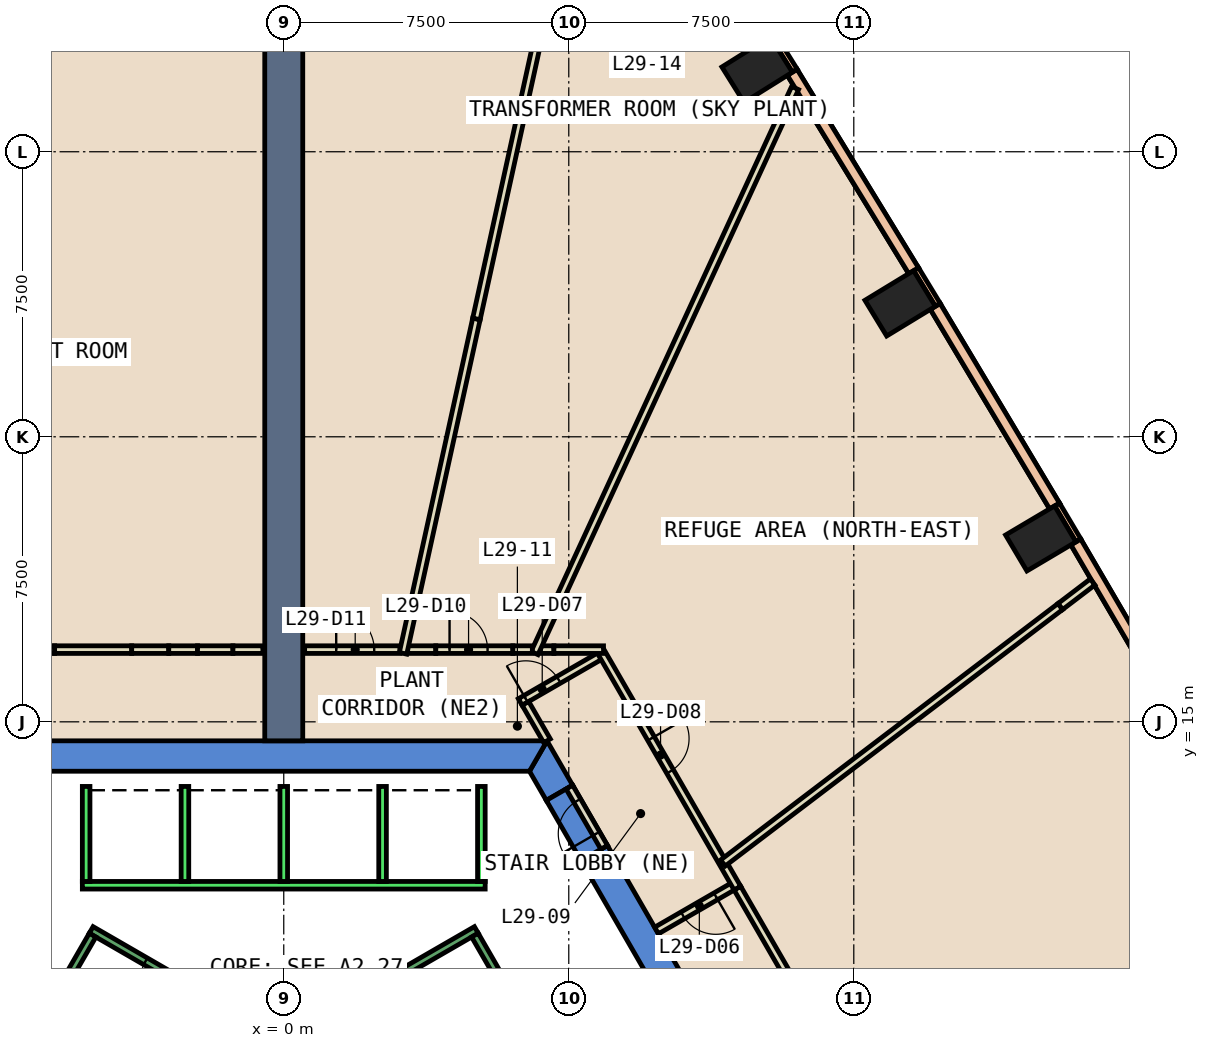
"""IFC4 building model, lengths in metres.
Left out: names, types, materials, properties, quantities, classifications, styles, units other than length and angle.
Written with IfcOpenShell. Run it as: python <this file> out.ifc"""

import sys

from ifc_helpers import new_model, si_unit, direction, frame, frame_2d, origin, origin_2d, place, context, subcontext, project, spatial, polyline, rectangle, outline, extrude, element, fill, save


model = new_model("IFC4")
c1 = context("Model", 3, precision=1e-05, world=origin(), true_north=direction((0.0, 1.0)))
c2 = subcontext(c1, "Body", "Model", "MODEL_VIEW")
j1 = project(units=[si_unit("LENGTHUNIT", "METRE"), si_unit("PLANEANGLEUNIT", "RADIAN")], contexts=[c1])
p1 = place(None, origin())
s1 = spatial("IfcSite", under=j1, at=p1, CompositionType="ELEMENT")
p2 = place(p1, origin())
s2 = spatial("IfcBuilding", under=s1, at=p2, CompositionType="ELEMENT")
p3 = place(p2, frame((0.0, 0.0, 132.8)))
s3 = spatial("IfcBuildingStorey", under=s2, at=p3, CompositionType="ELEMENT", Elevation=132.8)
for number, where, z_axis, x_axis in (
    (1, (19.92, 19.825, -0.6), (0.0, 0.0, 1.0), (-0.51, 0.86, 0.0)),
    (2, (16.22, 26.012, -0.6), (0.0, 0.0, 1.0), (-0.52, 0.854, 0.0)),
    (3, (12.457, 32.162, -0.6), (0.0, 0.0, 1.0), (-0.53, 0.848, 0.0)),
):
    element("IfcColumn", number, at=place(p3, frame(where, z_axis=z_axis, x_axis=x_axis)), inside=s3, PredefinedType="COLUMN", context=c2, shape_type="SweptSolid", body=[
        extrude(rectangle(XDim=1.1, YDim=1.5, at=origin_2d()), origin(), (0.0, 0.0, 1.0), 5.4),
    ])
p4 = place(p3, frame((0.0, 0.0, -0.6)))
e4 = element("IfcWall", 4, at=p4, inside=s3, PredefinedType="SHEAR", context=c2, shape_type="SweptSolid", body=[
    extrude(outline(polyline([(8.517, 11.747), (7.824, 11.347), (12.933, 2.5), (13.856, 2.5), (8.517, 11.747)])), origin(), (0.0, 0.0, 1.0), 5.4),
])
p5 = place(p3, frame((0.0, 0.0, -0.6)))
e5 = element("IfcWall", 5, at=p5, inside=s3, PredefinedType="SHEAR", context=c2, shape_type="SweptSolid", body=[
    extrude(outline(polyline([(6.909, 12.932), (7.602, 13.332), (6.928, 14.5), (6.466, 13.7), (6.909, 12.932)])), origin(), (0.0, 0.0, 1.0), 5.4),
])
p6 = place(p3, frame((0.0, 0.0, 3.6)))
e6 = element("IfcWall", 6, at=p6, inside=s3, PredefinedType="SHEAR", context=c2, shape_type="SweptSolid", body=[
    extrude(outline(polyline([(7.602, 13.332), (6.909, 12.932), (7.824, 11.347), (8.517, 11.747), (7.602, 13.332)])), origin(), (0.0, 0.0, 1.0), 1.2),
])
p7 = place(p3, frame((0.0, 0.0, -0.6)))
e7 = element("IfcWall", 7, at=p7, inside=s3, PredefinedType="SHEAR", context=c2, shape_type="SweptSolid", body=[
    extrude(outline(polyline([(6.928, 14.5), (-6.928, 14.5), (-6.466, 13.7), (6.466, 13.7), (6.928, 14.5)])), origin(), (0.0, 0.0, 1.0), 5.4),
])
p8 = place(p3, frame((0.0, 14.5, 0.0), z_axis=(0.0, 0.0, 1.0), x_axis=(0.0, 1.0, 0.0)))
e8 = element("IfcWall", 8, at=p8, inside=s3, PredefinedType="SHEAR", context=c2, shape_type="SweptSolid", body=[
    extrude(rectangle(XDim=27.714, YDim=1.0, at=frame_2d((13.857, 0.0))), origin(), (0.0, 0.0, 1.0), 4.8),
])
p9 = place(p3, frame((20.91, 19.773, 0.0), z_axis=(0.0, 0.0, 1.0), x_axis=(-0.509918002375, 0.860223012279, 0.0)))
e9 = element("IfcWall", 9, at=p9, inside=s3, PredefinedType="STANDARD", context=c2, shape_type="SweptSolid", body=[
    extrude(rectangle(XDim=1.1, YDim=0.15, at=frame_2d((0.55, 0.0))), origin(), (0.0, 0.0, 1.0), 4.8),
])
p10 = place(p3, frame((17.211, 25.971, 0.0), z_axis=(0.0, 0.0, 1.0), x_axis=(-0.519869515594, 0.854245682901, 0.0)))
e10 = element("IfcWall", 10, at=p10, inside=s3, PredefinedType="STANDARD", context=c2, shape_type="SweptSolid", body=[
    extrude(rectangle(XDim=1.1, YDim=0.15, at=frame_2d((0.55, 0.0))), origin(), (0.0, 0.0, 1.0), 4.8),
])
p11 = place(p3, frame((13.448, 32.133, 0.0), z_axis=(0.0, 0.0, 1.0), x_axis=(-0.52997899071, 0.848010771987, 0.0)))
e11 = element("IfcWall", 11, at=p11, inside=s3, PredefinedType="STANDARD", context=c2, shape_type="SweptSolid", body=[
    extrude(rectangle(XDim=1.1, YDim=0.15, at=frame_2d((0.55, 0.0))), origin(), (0.0, 0.0, 1.0), 4.8),
])
p12 = place(p3, frame((23.928, 14.449, 0.0), z_axis=(0.0, 0.0, 1.0), x_axis=(-0.504315008855, 0.863519757645, 0.0)))
e12 = element("IfcWall", 12, at=p12, inside=s3, PredefinedType="STANDARD", context=c2, shape_type="SweptSolid", body=[
    extrude(rectangle(XDim=6.119, YDim=0.3, at=frame_2d((3.06, 0.0))), origin(), (0.0, 0.0, 1.0), 1.2),
])
p13 = place(p3, frame((23.928, 14.449, 4.0), z_axis=(0.0, 0.0, 1.0), x_axis=(-0.504315008855, 0.863519757645, 0.0)))
e13 = element("IfcWall", 13, at=p13, inside=s3, PredefinedType="STANDARD", context=c2, shape_type="SweptSolid", body=[
    extrude(rectangle(XDim=6.119, YDim=0.3, at=frame_2d((3.06, 0.0))), origin(), (0.0, 0.0, 1.0), 0.8),
])
p14 = place(p3, frame((20.283, 20.679, 0.0), z_axis=(0.0, 0.0, 1.0), x_axis=(-0.513139723686, 0.858305087935, 0.0)))
e14 = element("IfcWall", 14, at=p14, inside=s3, PredefinedType="STANDARD", context=c2, shape_type="SweptSolid", body=[
    extrude(rectangle(XDim=6.119, YDim=0.3, at=frame_2d((3.06, 0.0))), origin(), (0.0, 0.0, 1.0), 1.2),
])
p15 = place(p3, frame((20.283, 20.679, 4.0), z_axis=(0.0, 0.0, 1.0), x_axis=(-0.513139723686, 0.858305087935, 0.0)))
e15 = element("IfcWall", 15, at=p15, inside=s3, PredefinedType="STANDARD", context=c2, shape_type="SweptSolid", body=[
    extrude(rectangle(XDim=6.119, YDim=0.3, at=frame_2d((3.06, 0.0))), origin(), (0.0, 0.0, 1.0), 0.8),
])
p16 = place(p3, frame((16.574, 26.87, 0.0), z_axis=(0.0, 0.0, 1.0), x_axis=(-0.521983927326, 0.852955320995, 0.0)))
e16 = element("IfcWall", 16, at=p16, inside=s3, PredefinedType="STANDARD", context=c2, shape_type="SweptSolid", body=[
    extrude(rectangle(XDim=6.121, YDim=0.3, at=frame_2d((3.061, 0.0))), origin(), (0.0, 0.0, 1.0), 1.2),
])
p17 = place(p3, frame((16.574, 26.87, 4.0), z_axis=(0.0, 0.0, 1.0), x_axis=(-0.521983927326, 0.852955320995, 0.0)))
e17 = element("IfcWall", 17, at=p17, inside=s3, PredefinedType="STANDARD", context=c2, shape_type="SweptSolid", body=[
    extrude(rectangle(XDim=6.121, YDim=0.3, at=frame_2d((3.061, 0.0))), origin(), (0.0, 0.0, 1.0), 0.8),
])
p18 = place(p3, frame((11.888, 10.709, 0.0), z_axis=(0.0, 0.0, 1.0), x_axis=(-0.865973769406, -0.500089422704, 0.0)))
e18 = element("IfcWall", 18, at=p18, inside=s3, PredefinedType="PARTITIONING", context=c2, shape_type="SweptSolid", body=[
    extrude(rectangle(XDim=2.399, YDim=0.2, at=frame_2d((1.2, 0.0))), origin(), (0.0, 0.0, 1.0), 2.4),
])
p19 = place(p18, frame((0.6, 0.0, 0.0)))
e19 = element("IfcOpeningElement", 19, at=p19, cuts=e18, PredefinedType="OPENING", context=c2, shape_type="SweptSolid", body=[
    extrude(rectangle(XDim=1.0, YDim=2.1, at=frame_2d((0.5, 1.05))), frame((0.0, 0.11, 0.0), z_axis=(0.0, -1.0, 0.0), x_axis=(1.0, 0.0, 0.0)), (0.0, 0.0, 1.0), 0.22),
])
p20 = place(p3, frame((6.223, 15.521, 0.0), z_axis=(0.0, 0.0, 1.0), x_axis=(0.866022959057, 0.500004234368, 0.0)))
e20 = element("IfcWall", 20, at=p20, inside=s3, PredefinedType="PARTITIONING", context=c2, shape_type="SweptSolid", body=[
    extrude(rectangle(XDim=2.5, YDim=0.2, at=frame_2d((1.25, 0.0))), origin(), (0.0, 0.0, 1.0), 4.8),
])
p21 = place(p20, frame((0.168, 0.0, 0.0)))
e21 = element("IfcOpeningElement", 21, at=p21, cuts=e20, PredefinedType="OPENING", context=c2, shape_type="SweptSolid", body=[
    extrude(rectangle(XDim=1.0, YDim=2.1, at=frame_2d((0.5, 1.05))), frame((0.0, 0.11, 0.0), z_axis=(0.0, -1.0, 0.0), x_axis=(1.0, 0.0, 0.0)), (0.0, 0.0, 1.0), 0.22),
])
p22 = place(p3, frame((6.36, 15.484, 0.0), z_axis=(0.0, 0.0, 1.0), x_axis=(0.499883687939, -0.866092546171, 0.0)))
e22 = element("IfcWall", 22, at=p22, inside=s3, PredefinedType="PARTITIONING", context=c2, shape_type="SweptSolid", body=[
    extrude(rectangle(XDim=1.136, YDim=0.2, at=frame_2d((0.568, 0.0))), origin(), (0.0, 0.0, 1.0), 2.4),
])
p23 = place(p3, frame((8.338, 16.858, 0.0), z_axis=(0.0, 0.0, 1.0), x_axis=(0.499982693035, -0.866035395735, 0.0)))
e23 = element("IfcWall", 23, at=p23, inside=s3, PredefinedType="PARTITIONING", context=c2, shape_type="SweptSolid", body=[
    extrude(rectangle(XDim=7.2, YDim=0.2, at=frame_2d((3.6, 0.0))), origin(), (0.0, 0.0, 1.0), 4.8),
])
p24 = place(p23, frame((2.655, 0.0, 0.0)))
e24 = element("IfcOpeningElement", 24, at=p24, cuts=e23, PredefinedType="OPENING", context=c2, shape_type="SweptSolid", body=[
    extrude(rectangle(XDim=1.0, YDim=2.1, at=frame_2d((0.5, 1.05))), frame((0.0, 0.11, 0.0), z_axis=(0.0, -1.0, 0.0), x_axis=(1.0, 0.0, 0.0)), (0.0, 0.0, 1.0), 0.22),
])
p25 = place(p3, frame((11.938, 10.622, 0.0), z_axis=(0.0, 0.0, 1.0), x_axis=(0.499964736285, -0.866045762343, 0.0)))
e25 = element("IfcWall", 25, at=p25, inside=s3, PredefinedType="PARTITIONING", context=c2, shape_type="SweptSolid", body=[
    extrude(rectangle(XDim=9.479, YDim=0.2, at=frame_2d((4.739, 0.0))), origin(), (0.0, 0.0, 1.0), 4.8),
])
p26 = place(p25, frame((8.161, 0.0, 0.0)))
e26 = element("IfcOpeningElement", 26, at=p26, cuts=e25, PredefinedType="OPENING", context=c2, shape_type="SweptSolid", body=[
    extrude(rectangle(XDim=1.0, YDim=2.1, at=frame_2d((0.5, 1.05))), frame((0.0, 0.11, 0.0), z_axis=(0.0, -1.0, 0.0), x_axis=(1.0, 0.0, 0.0)), (0.0, 0.0, 1.0), 0.22),
])
p27 = place(p3, frame((6.741, 16.9, 0.0), z_axis=(0.0, 0.0, 1.0), x_axis=(1.0, 0.0, 0.0)))
e27 = element("IfcWall", 27, at=p27, inside=s3, PredefinedType="PARTITIONING", context=c2, shape_type="SweptSolid", body=[
    extrude(rectangle(XDim=0.368, YDim=0.2, at=frame_2d((0.184, 0.0))), origin(), (0.0, 0.0, 1.0), 2.4),
])
p28 = place(p3, frame((3.26, 16.9, 0.0), z_axis=(0.0, 0.0, 1.0), x_axis=(1.0, 0.0, 0.0)))
e28 = element("IfcWall", 28, at=p28, inside=s3, PredefinedType="PARTITIONING", context=c2, shape_type="SweptSolid", body=[
    extrude(rectangle(XDim=0.741, YDim=0.2, at=frame_2d((0.371, 0.0))), origin(), (0.0, 0.0, 1.0), 2.4),
])
p29 = place(p3, frame((0.55, 16.9, 0.0), z_axis=(0.0, 0.0, 1.0), x_axis=(1.0, 0.0, 0.0)))
e29 = element("IfcWall", 29, at=p29, inside=s3, PredefinedType="PARTITIONING", context=c2, shape_type="SweptSolid", body=[
    extrude(rectangle(XDim=2.51, YDim=0.2, at=frame_2d((1.255, 0.0))), origin(), (0.0, 0.0, 1.0), 4.8),
])
p30 = place(p29, frame((0.83, 0.0, 0.0)))
e30 = element("IfcOpeningElement", 30, at=p30, cuts=e29, PredefinedType="OPENING", context=c2, shape_type="SweptSolid", body=[
    extrude(rectangle(XDim=1.0, YDim=2.1, at=frame_2d((0.5, 1.05))), frame((0.0, 0.11, 0.0), z_axis=(0.0, -1.0, 0.0), x_axis=(1.0, 0.0, 0.0)), (0.0, 0.0, 1.0), 0.22),
])
p31 = place(p3, frame((21.284, 18.68, 0.0), z_axis=(0.0, 0.0, 1.0), x_axis=(-0.795986361327, -0.605314556723, 0.0)))
e31 = element("IfcWall", 31, at=p31, inside=s3, PredefinedType="PARTITIONING", context=c2, shape_type="SweptSolid", body=[
    extrude(rectangle(XDim=1.07, YDim=0.2, at=frame_2d((0.535, 0.0))), origin(), (0.0, 0.0, 1.0), 2.4),
])
p32 = place(p3, frame((6.599, 16.809, 0.0), z_axis=(0.0, 0.0, 1.0), x_axis=(0.418797177025, 0.908079800742, 0.0)))
e32 = element("IfcWall", 32, at=p32, inside=s3, PredefinedType="PARTITIONING", context=c2, shape_type="SweptSolid", body=[
    extrude(rectangle(XDim=16.373, YDim=0.2, at=frame_2d((8.187, 0.0))), origin(), (0.0, 0.0, 1.0), 2.4),
])
p33 = place(p3, frame((3.139, 16.802, 0.0), z_axis=(0.0, 0.0, 1.0), x_axis=(0.21434739217, 0.976757490614, 0.0)))
e33 = element("IfcWall", 33, at=p33, inside=s3, PredefinedType="PARTITIONING", context=c2, shape_type="SweptSolid", body=[
    extrude(rectangle(XDim=9.01, YDim=0.2, at=frame_2d((4.505, 0.0))), origin(), (0.0, 0.0, 1.0), 2.4),
])
p34 = place(p3, frame((8.431, 11.698, 0.0), z_axis=(0.0, 0.0, 1.0), x_axis=(-0.500115259676, 0.865958848352, 0.0)))
e34 = element("IfcWall", 34, at=p34, inside=s3, PredefinedType="PARTITIONING", context=c2, shape_type="SweptSolid", body=[
    extrude(rectangle(XDim=1.829, YDim=0.2, at=frame_2d((0.915, 0.0))), origin(), (0.0, 0.0, 1.0), 2.4),
])
p35 = place(p34, frame((0.415, 0.0, 0.0)))
e35 = element("IfcOpeningElement", 35, at=p35, cuts=e34, PredefinedType="OPENING", context=c2, shape_type="SweptSolid", body=[
    extrude(rectangle(XDim=1.0, YDim=2.1, at=frame_2d((0.5, 1.05))), frame((0.0, 0.11, 0.0), z_axis=(0.0, -1.0, 0.0), x_axis=(1.0, 0.0, 0.0)), (0.0, 0.0, 1.0), 0.22),
])
p36 = place(p3, frame((7.109, 16.9, 0.0), z_axis=(0.0, 0.0, 1.0), x_axis=(1.0, 0.0, 0.0)))
e36 = element("IfcWall", 36, at=p36, inside=s3, PredefinedType="PARTITIONING", context=c2, shape_type="SweptSolid", body=[
    extrude(rectangle(XDim=1.305, YDim=0.2, at=frame_2d((0.653, 0.0))), origin(), (0.0, 0.0, 1.0), 4.8),
])
p37 = place(p3, frame((4.001, 16.9, 0.0), z_axis=(0.0, 0.0, 1.0), x_axis=(1.0, 0.0, 0.0)))
e37 = element("IfcWall", 37, at=p37, inside=s3, PredefinedType="PARTITIONING", context=c2, shape_type="SweptSolid", body=[
    extrude(rectangle(XDim=2.028, YDim=0.2, at=frame_2d((1.014, 0.0))), origin(), (0.0, 0.0, 1.0), 4.8),
])
p38 = place(p37, frame((0.362, 0.0, 0.0)))
e38 = element("IfcOpeningElement", 38, at=p38, cuts=e37, PredefinedType="OPENING", context=c2, shape_type="SweptSolid", body=[
    extrude(rectangle(XDim=1.0, YDim=2.1, at=frame_2d((0.5, 1.05))), frame((0.0, 0.11, 0.0), z_axis=(0.0, -1.0, 0.0), x_axis=(1.0, 0.0, 0.0)), (0.0, 0.0, 1.0), 0.22),
])
p39 = place(p3, frame((6.029, 16.9, 0.0), z_axis=(0.0, 0.0, 1.0), x_axis=(1.0, 0.0, 0.0)))
e39 = element("IfcWall", 39, at=p39, inside=s3, PredefinedType="PARTITIONING", context=c2, shape_type="SweptSolid", body=[
    extrude(rectangle(XDim=0.512, YDim=0.2, at=frame_2d((0.256, 0.0))), origin(), (0.0, 0.0, 1.0), 2.4),
])
p40 = place(p3, frame((20.432, 18.032, 0.0), z_axis=(0.0, 0.0, 1.0), x_axis=(-0.796104804042, -0.605158773366, 0.0)))
e40 = element("IfcWall", 40, at=p40, inside=s3, PredefinedType="PARTITIONING", context=c2, shape_type="SweptSolid", body=[
    extrude(rectangle(XDim=11.149, YDim=0.2, at=frame_2d((5.575, 0.0))), origin(), (0.0, 0.0, 1.0), 4.8),
])
p41 = place(p3, frame((5.07, 25.602, 0.0), z_axis=(0.0, 0.0, 1.0), x_axis=(0.214352205631, 0.976756434297, 0.0)))
e41 = element("IfcWall", 41, at=p41, inside=s3, PredefinedType="PARTITIONING", context=c2, shape_type="SweptSolid", body=[
    extrude(rectangle(XDim=12.787, YDim=0.2, at=frame_2d((6.394, 0.0))), origin(), (0.0, 0.0, 1.0), 4.8),
])
p42 = place(p3, frame((-7.109, 16.9, 0.0), z_axis=(0.0, 0.0, 1.0), x_axis=(1.0, 0.0, 0.0)))
e42 = element("IfcWall", 42, at=p42, inside=s3, PredefinedType="PARTITIONING", context=c2, shape_type="SweptSolid", body=[
    extrude(rectangle(XDim=1.08, YDim=0.2, at=frame_2d((0.54, 0.0))), origin(), (0.0, 0.0, 1.0), 2.4),
])
p43 = place(p3, frame((-6.029, 16.9, 0.0), z_axis=(0.0, 0.0, 1.0), x_axis=(1.0, 0.0, 0.0)))
e43 = element("IfcWall", 43, at=p43, inside=s3, PredefinedType="PARTITIONING", context=c2, shape_type="SweptSolid", body=[
    extrude(rectangle(XDim=2.028, YDim=0.2, at=frame_2d((1.014, 0.0))), origin(), (0.0, 0.0, 1.0), 4.8),
])
p44 = place(p3, frame((-4.001, 16.9, 0.0), z_axis=(0.0, 0.0, 1.0), x_axis=(1.0, 0.0, 0.0)))
e44 = element("IfcWall", 44, at=p44, inside=s3, PredefinedType="PARTITIONING", context=c2, shape_type="SweptSolid", body=[
    extrude(rectangle(XDim=0.975, YDim=0.2, at=frame_2d((0.488, 0.0))), origin(), (0.0, 0.0, 1.0), 2.4),
])
p45 = place(p3, frame((-3.026, 16.9, 0.0), z_axis=(0.0, 0.0, 1.0), x_axis=(1.0, 0.0, 0.0)))
e45 = element("IfcWall", 45, at=p45, inside=s3, PredefinedType="PARTITIONING", context=c2, shape_type="SweptSolid", body=[
    extrude(rectangle(XDim=0.757, YDim=0.2, at=frame_2d((0.378, 0.0))), origin(), (0.0, 0.0, 1.0), 4.8),
])
p46 = place(p3, frame((-2.269, 16.9, 0.0), z_axis=(0.0, 0.0, 1.0), x_axis=(1.0, 0.0, 0.0)))
e46 = element("IfcWall", 46, at=p46, inside=s3, PredefinedType="PARTITIONING", context=c2, shape_type="SweptSolid", body=[
    extrude(rectangle(XDim=0.932, YDim=0.2, at=frame_2d((0.466, 0.0))), origin(), (0.0, 0.0, 1.0), 2.4),
])
p47 = place(p3, frame((-1.337, 16.9, 0.0), z_axis=(0.0, 0.0, 1.0), x_axis=(1.0, 0.0, 0.0)))
e47 = element("IfcWall", 47, at=p47, inside=s3, PredefinedType="PARTITIONING", context=c2, shape_type="SweptSolid", body=[
    extrude(rectangle(XDim=0.787, YDim=0.2, at=frame_2d((0.394, 0.0))), origin(), (0.0, 0.0, 1.0), 4.8),
])
p48 = place(p3, frame((5.3, 10.7, 0.0), z_axis=(0.0, 0.0, 1.0), x_axis=(-1.0, 0.0, 0.0)))
e48 = element("IfcWall", 48, at=p48, inside=s3, PredefinedType="STANDARD", context=c2, shape_type="SweptSolid", body=[
    extrude(rectangle(XDim=10.6, YDim=0.2, at=frame_2d((5.3, 0.0))), origin(), (0.0, 0.0, 1.0), 4.8),
])
for number, where, z_axis, x_axis in (
    (49, (5.2, 10.8, 0.0), (0.0, 0.0, 1.0), (0.0, 1.0, 0.0)),
    (50, (2.6, 10.8, 0.0), (0.0, 0.0, 1.0), (0.0, 1.0, 0.0)),
    (51, (0.0, 10.8, 0.0), (0.0, 0.0, 1.0), (0.0, 1.0, 0.0)),
    (52, (-2.6, 10.8, 0.0), (0.0, 0.0, 1.0), (0.0, 1.0, 0.0)),
    (53, (-5.2, 10.8, 0.0), (0.0, 0.0, 1.0), (0.0, 1.0, 0.0)),
):
    element("IfcWall", number, at=place(p3, frame(where, z_axis=z_axis, x_axis=x_axis)), inside=s3, PredefinedType="STANDARD", context=c2, shape_type="SweptSolid", body=[
        extrude(rectangle(XDim=2.5, YDim=0.2, at=frame_2d((1.25, 0.0))), origin(), (0.0, 0.0, 1.0), 4.8),
    ])
p49 = place(p3, frame((1.256, 7.324, 0.0), z_axis=(0.0, 0.0, 1.0), x_axis=(0.866046073146, 0.499964197906, 0.0)))
e54 = element("IfcWall", 54, at=p49, inside=s3, PredefinedType="STANDARD", context=c2, shape_type="SweptSolid", body=[
    extrude(rectangle(XDim=4.4, YDim=0.2, at=frame_2d((2.2, 0.0))), origin(), (0.0, 0.0, 1.0), 4.8),
])
p50 = place(p3, frame((8.48, 3.412, 0.0), z_axis=(0.0, 0.0, 1.0), x_axis=(-0.499978703459, 0.866037698999, 0.0)))
e55 = element("IfcWall", 55, at=p50, inside=s3, PredefinedType="STANDARD", context=c2, shape_type="SweptSolid", body=[
    extrude(rectangle(XDim=6.9, YDim=0.2, at=frame_2d((3.45, 0.0))), origin(), (0.0, 0.0, 1.0), 4.8),
])
p51 = place(p3, frame((-1.256, 7.324, 0.0), z_axis=(0.0, 0.0, 1.0), x_axis=(-0.866046073146, 0.499964197906, 0.0)))
e56 = element("IfcWall", 56, at=p51, inside=s3, PredefinedType="STANDARD", context=c2, shape_type="SweptSolid", body=[
    extrude(rectangle(XDim=4.4, YDim=0.2, at=frame_2d((2.2, 0.0))), origin(), (0.0, 0.0, 1.0), 4.8),
])
p52 = place(p51, frame((1.65, 0.0, 0.0)))
e57 = element("IfcOpeningElement", 57, at=p52, cuts=e56, PredefinedType="OPENING", context=c2, shape_type="SweptSolid", body=[
    extrude(rectangle(XDim=1.1, YDim=2.2, at=frame_2d((0.55, 1.1))), frame((0.0, 0.11, 0.0), z_axis=(0.0, -1.0, 0.0), x_axis=(1.0, 0.0, 0.0)), (0.0, 0.0, 1.0), 0.22),
])
p53 = place(p3, frame((-5.03, 9.388, 0.0), z_axis=(0.0, 0.0, 1.0), x_axis=(-0.499978703459, -0.866037698999, 0.0)))
e58 = element("IfcWall", 58, at=p53, inside=s3, PredefinedType="STANDARD", context=c2, shape_type="SweptSolid", body=[
    extrude(rectangle(XDim=6.9, YDim=0.2, at=frame_2d((3.45, 0.0))), origin(), (0.0, 0.0, 1.0), 4.8),
])
p54 = place(p19, origin())
e59 = element("IfcDoor", 59, at=p54, inside=s3, OperationType="SINGLE_SWING_RIGHT", PredefinedType="DOOR", context=c2, shape_type="SweptSolid", body=[
    extrude(rectangle(XDim=1.0, YDim=2.1, at=frame_2d((0.5, 1.05))), frame((0.0, 0.025, 0.0), z_axis=(0.0, -1.0, 0.0), x_axis=(1.0, 0.0, 0.0)), (0.0, 0.0, 1.0), 0.05),
])
fill(e19, e59)
p55 = place(p21, origin())
e60 = element("IfcDoor", 60, at=p55, inside=s3, OperationType="SINGLE_SWING_LEFT", PredefinedType="DOOR", context=c2, shape_type="SweptSolid", body=[
    extrude(rectangle(XDim=1.0, YDim=2.1, at=frame_2d((0.5, 1.05))), frame((0.0, 0.025, 0.0), z_axis=(0.0, -1.0, 0.0), x_axis=(1.0, 0.0, 0.0)), (0.0, 0.0, 1.0), 0.05),
])
fill(e21, e60)
p56 = place(p24, origin())
e61 = element("IfcDoor", 61, at=p56, inside=s3, OperationType="SINGLE_SWING_RIGHT", PredefinedType="DOOR", context=c2, shape_type="SweptSolid", body=[
    extrude(rectangle(XDim=1.0, YDim=2.1, at=frame_2d((0.5, 1.05))), frame((0.0, 0.025, 0.0), z_axis=(0.0, -1.0, 0.0), x_axis=(1.0, 0.0, 0.0)), (0.0, 0.0, 1.0), 0.05),
])
fill(e24, e61)
p57 = place(p38, origin())
e62 = element("IfcDoor", 62, at=p57, inside=s3, OperationType="SINGLE_SWING_RIGHT", PredefinedType="DOOR", context=c2, shape_type="SweptSolid", body=[
    extrude(rectangle(XDim=1.0, YDim=2.1, at=frame_2d((0.5, 1.05))), frame((0.0, 0.025, 0.0), z_axis=(0.0, -1.0, 0.0), x_axis=(1.0, 0.0, 0.0)), (0.0, 0.0, 1.0), 0.05),
])
fill(e38, e62)
p58 = place(p30, origin())
e63 = element("IfcDoor", 63, at=p58, inside=s3, OperationType="SINGLE_SWING_LEFT", PredefinedType="DOOR", context=c2, shape_type="SweptSolid", body=[
    extrude(rectangle(XDim=1.0, YDim=2.1, at=frame_2d((0.5, 1.05))), frame((0.0, 0.025, 0.0), z_axis=(0.0, -1.0, 0.0), x_axis=(1.0, 0.0, 0.0)), (0.0, 0.0, 1.0), 0.05),
])
fill(e30, e63)
p59 = place(p35, origin())
e64 = element("IfcDoor", 64, at=p59, inside=s3, OperationType="SINGLE_SWING_LEFT", PredefinedType="DOOR", context=c2, shape_type="SweptSolid", body=[
    extrude(rectangle(XDim=1.0, YDim=2.1, at=frame_2d((0.5, 1.05))), frame((0.0, 0.025, 0.0), z_axis=(0.0, -1.0, 0.0), x_axis=(1.0, 0.0, 0.0)), (0.0, 0.0, 1.0), 0.05),
])
fill(e35, e64)
p60 = place(p52, origin())
e65 = element("IfcDoor", 65, at=p60, inside=s3, OperationType="SINGLE_SWING_LEFT", PredefinedType="DOOR", context=c2, shape_type="SweptSolid", body=[
    extrude(rectangle(XDim=1.1, YDim=2.2, at=frame_2d((0.55, 1.1))), frame((0.0, 0.025, 0.0), z_axis=(0.0, -1.0, 0.0), x_axis=(1.0, 0.0, 0.0)), (0.0, 0.0, 1.0), 0.05),
])
fill(e57, e65)
save(model, sys.argv[1])
